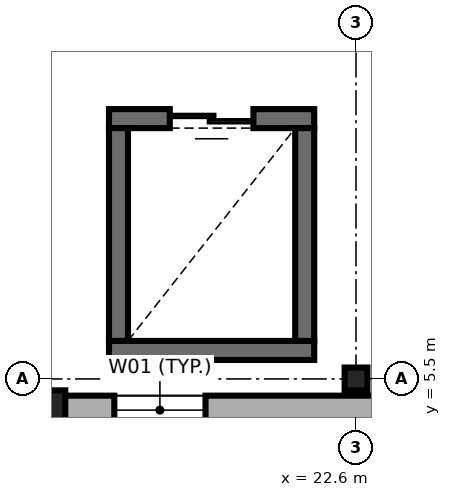
"""IFC4 building model, lengths in metres.
Left out: names, types, materials, properties, quantities, classifications, styles, units other than length and angle.
Written with IfcOpenShell. Run it as: python <this file> out.ifc"""

import sys

from ifc_helpers import new_model, si_unit, direction, frame, frame_2d, origin, origin_2d, place, context, subcontext, project, spatial, rectangle, i_section, extrude, element, fill, save


model = new_model("IFC4")
c1 = context("Model", 3, precision=1e-05, world=origin(), true_north=direction((0.0, 1.0)))
c2 = subcontext(c1, "Body", "Model", "MODEL_VIEW")
j1 = project(units=[si_unit("LENGTHUNIT", "METRE"), si_unit("PLANEANGLEUNIT", "RADIAN")], contexts=[c1])
p1 = place(None, origin())
s1 = spatial("IfcSite", under=j1, at=p1, CompositionType="ELEMENT")
p2 = place(p1, origin())
s2 = spatial("IfcBuilding", under=s1, at=p2, CompositionType="ELEMENT")
p3 = place(p2, frame((0.0, 0.0, 9.3)))
s3 = spatial("IfcBuildingStorey", under=s2, at=p3, CompositionType="ELEMENT", Elevation=9.3)
p4 = place(p3, frame((18.6, 5.05, 0.0), z_axis=(0.0, 0.0, 1.0), x_axis=(1.0, 0.0, 0.0)))
e1 = element("IfcColumn", 1, at=p4, inside=s3, PredefinedType="PILASTER", context=c2, shape_type="SweptSolid", body=[
    extrude(rectangle(XDim=0.35, YDim=0.6, at=origin_2d()), origin(), (0.0, 0.0, 1.0), 4.5),
])
p5 = place(p3, frame((22.6, 5.5, 0.0), z_axis=(0.0, 0.0, 1.0), x_axis=(1.0, 0.0, 0.0)))
e2 = element("IfcColumn", 2, at=p5, inside=s3, PredefinedType="COLUMN", context=c2, shape_type="SweptSolid", body=[
    extrude(i_section(OverallWidth=0.3, OverallDepth=0.3, WebThickness=0.011, FlangeThickness=0.019, FilletRadius=0.027, at=origin_2d()), origin(), (0.0, 0.0, 1.0), 4.5),
])
p6 = place(p3, frame((19.35, 5.875, 0.0), z_axis=(0.0, 0.0, 1.0), x_axis=(1.0, 0.0, 0.0)))
e3 = element("IfcWall", 3, at=p6, inside=s3, PredefinedType="SHEAR", context=c2, shape_type="SweptSolid", body=[
    extrude(rectangle(XDim=2.7, YDim=0.25, at=frame_2d((1.35, 0.0))), origin(), (0.0, 0.0, 1.0), 4.5),
])
p7 = place(p3, frame((22.05, 8.925, 0.0), z_axis=(0.0, 0.0, 1.0), x_axis=(-1.0, 0.0, 0.0)))
e4 = element("IfcWall", 4, at=p7, inside=s3, PredefinedType="SHEAR", context=c2, shape_type="SweptSolid", body=[
    extrude(rectangle(XDim=2.7, YDim=0.25, at=frame_2d((1.35, 0.0))), origin(), (0.0, 0.0, 1.0), 4.5),
])
p8 = place(p7, frame((0.8, 0.0, 0.0)))
e5 = element("IfcOpeningElement", 5, at=p8, cuts=e4, PredefinedType="OPENING", context=c2, shape_type="SweptSolid", body=[
    extrude(rectangle(XDim=1.1, YDim=2.15, at=frame_2d((0.55, 1.075))), frame((0.0, 0.135, 0.0), z_axis=(0.0, -1.0, 0.0), x_axis=(1.0, 0.0, 0.0)), (0.0, 0.0, 1.0), 0.27),
])
for number, where, z_axis, x_axis in (
    (6, (19.475, 8.8, 0.0), (0.0, 0.0, 1.0), (0.0, -1.0, 0.0)),
    (7, (21.925, 6.0, 0.0), (0.0, 0.0, 1.0), (0.0, 1.0, 0.0)),
):
    element("IfcWall", number, at=place(p3, frame(where, z_axis=z_axis, x_axis=x_axis)), inside=s3, PredefinedType="SHEAR", context=c2, shape_type="SweptSolid", body=[
        extrude(rectangle(XDim=2.8, YDim=0.25, at=frame_2d((1.4, 0.0))), origin(), (0.0, 0.0, 1.0), 4.5),
    ])
p9 = place(p3, frame((5.962, 5.09, 0.0), z_axis=(0.0, 0.0, 1.0), x_axis=(1.0, 0.0, 0.0)))
e8 = element("IfcWall", 8, at=p9, inside=s3, PredefinedType="SOLIDWALL", context=c2, shape_type="SweptSolid", body=[
    extrude(rectangle(XDim=48.176, YDim=0.38, at=frame_2d((24.088, 0.0))), origin(), (0.0, 0.0, 1.0), 4.25),
])
p10 = place(p9, frame((10.614, 0.0, 0.9)))
e9 = element("IfcOpeningElement", 9, at=p10, cuts=e8, PredefinedType="OPENING", context=c2, shape_type="SweptSolid", body=[
    extrude(rectangle(XDim=1.2, YDim=2.4, at=frame_2d((0.6, 1.2))), frame((0.0, 0.2, 0.0), z_axis=(0.0, -1.0, 0.0), x_axis=(1.0, 0.0, 0.0)), (0.0, 0.0, 1.0), 0.4),
])
p11 = place(p9, frame((13.458, 0.0, 0.9)))
e10 = element("IfcOpeningElement", 10, at=p11, cuts=e8, PredefinedType="OPENING", context=c2, shape_type="SweptSolid", body=[
    extrude(rectangle(XDim=1.2, YDim=1.8, at=frame_2d((0.6, 0.9))), frame((0.0, 0.2, 0.0), z_axis=(0.0, -1.0, 0.0), x_axis=(1.0, 0.0, 0.0)), (0.0, 0.0, 1.0), 0.4),
])
p12 = place(p9, frame((29.738, 0.0, 0.9)))
e11 = element("IfcOpeningElement", 11, at=p12, cuts=e8, PredefinedType="OPENING", context=c2, shape_type="SweptSolid", body=[
    extrude(rectangle(XDim=1.8, YDim=2.1, at=frame_2d((0.9, 1.05))), frame((0.0, 0.2, 0.0), z_axis=(0.0, -1.0, 0.0), x_axis=(1.0, 0.0, 0.0)), (0.0, 0.0, 1.0), 0.4),
])
p13 = place(p9, frame((34.188, 0.0, 0.9)))
e12 = element("IfcOpeningElement", 12, at=p13, cuts=e8, PredefinedType="OPENING", context=c2, shape_type="SweptSolid", body=[
    extrude(rectangle(XDim=0.9, YDim=1.4, at=frame_2d((0.45, 0.7))), frame((0.0, 0.2, 0.0), z_axis=(0.0, -1.0, 0.0), x_axis=(1.0, 0.0, 0.0)), (0.0, 0.0, 1.0), 0.4),
])
p14 = place(p9, frame((37.258, 0.0, 0.9)))
e13 = element("IfcOpeningElement", 13, at=p14, cuts=e8, PredefinedType="OPENING", context=c2, shape_type="SweptSolid", body=[
    extrude(rectangle(XDim=0.9, YDim=1.8, at=frame_2d((0.45, 0.9))), frame((0.0, 0.2, 0.0), z_axis=(0.0, -1.0, 0.0), x_axis=(1.0, 0.0, 0.0)), (0.0, 0.0, 1.0), 0.4),
])
p15 = place(p9, frame((39.018, 0.0, 0.9)))
e14 = element("IfcOpeningElement", 14, at=p15, cuts=e8, PredefinedType="OPENING", context=c2, shape_type="SweptSolid", body=[
    extrude(rectangle(XDim=0.9, YDim=1.8, at=frame_2d((0.45, 0.9))), frame((0.0, 0.2, 0.0), z_axis=(0.0, -1.0, 0.0), x_axis=(1.0, 0.0, 0.0)), (0.0, 0.0, 1.0), 0.4),
])
p16 = place(p9, frame((41.538, 0.0, 0.9)))
e15 = element("IfcOpeningElement", 15, at=p16, cuts=e8, PredefinedType="OPENING", context=c2, shape_type="SweptSolid", body=[
    extrude(rectangle(XDim=1.2, YDim=1.8, at=frame_2d((0.6, 0.9))), frame((0.0, 0.2, 0.0), z_axis=(0.0, -1.0, 0.0), x_axis=(1.0, 0.0, 0.0)), (0.0, 0.0, 1.0), 0.4),
])
p17 = place(p9, frame((44.438, 0.0, 0.9)))
e16 = element("IfcOpeningElement", 16, at=p17, cuts=e8, PredefinedType="OPENING", context=c2, shape_type="SweptSolid", body=[
    extrude(rectangle(XDim=1.4, YDim=1.65, at=frame_2d((0.7, 0.825))), frame((0.0, 0.2, 0.0), z_axis=(0.0, -1.0, 0.0), x_axis=(1.0, 0.0, 0.0)), (0.0, 0.0, 1.0), 0.4),
])
p18 = place(p8, origin())
e17 = element("IfcDoor", 17, at=p18, inside=s3, OperationType="DOUBLE_DOOR_SLIDING", PredefinedType="DOOR", context=c2, shape_type="SweptSolid", body=[
    extrude(rectangle(XDim=1.1, YDim=2.15, at=frame_2d((0.55, 1.075))), frame((0.0, 0.025, 0.0), z_axis=(0.0, -1.0, 0.0), x_axis=(1.0, 0.0, 0.0)), (0.0, 0.0, 1.0), 0.05),
])
fill(e5, e17)
p19 = place(p11, origin())
e18 = element("IfcWindow", 18, at=p19, inside=s3, PartitioningType="SINGLE_PANEL", PredefinedType="WINDOW", context=c2, shape_type="SweptSolid", body=[
    extrude(rectangle(XDim=1.2, YDim=1.8, at=frame_2d((0.6, 0.9))), frame((0.0, 0.03, 0.0), z_axis=(0.0, -1.0, 0.0), x_axis=(1.0, 0.0, 0.0)), (0.0, 0.0, 1.0), 0.06),
])
fill(e10, e18)
save(model, sys.argv[1])
